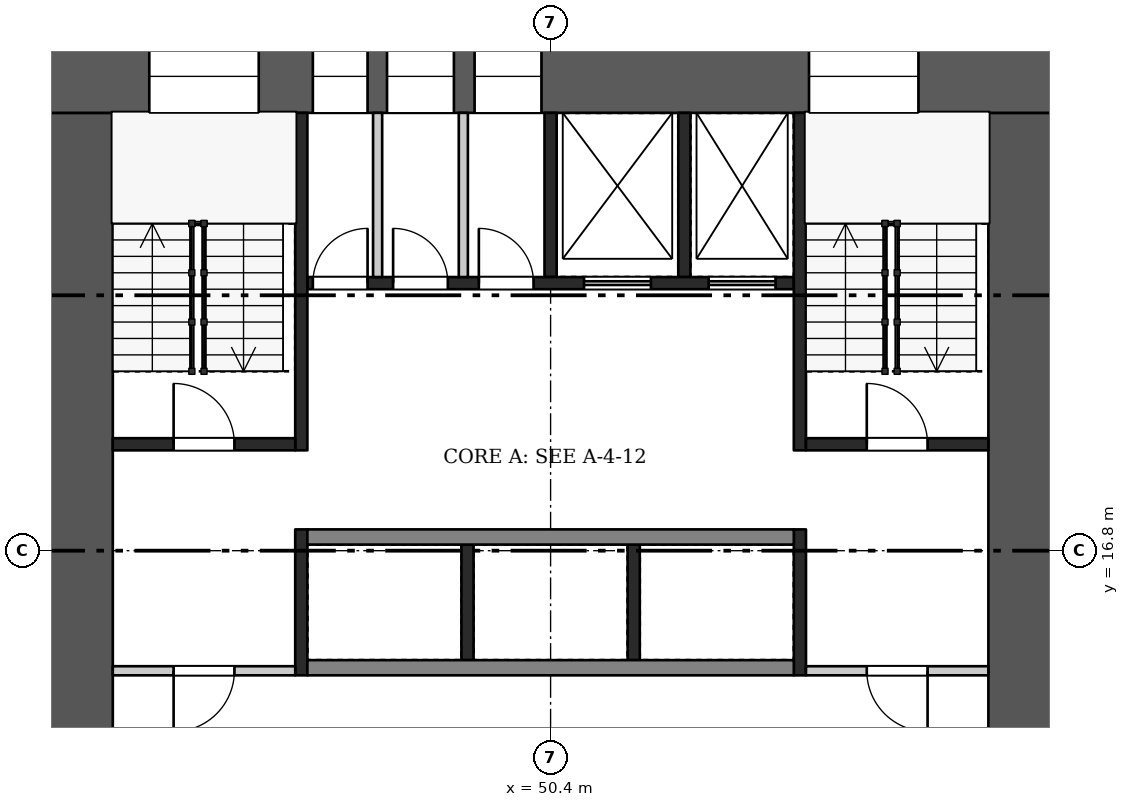
"""IFC4 building model, lengths in metres.
Left out: names, types, materials, properties, quantities, classifications, styles, units other than length and angle.
Written with IfcOpenShell. Run it as: python <this file> out.ifc"""

import sys

from ifc_helpers import new_model, si_unit, direction, frame, frame_2d, origin, place, context, subcontext, project, spatial, rectangle, extrude, element, fill, save


model = new_model("IFC4")
c1 = context("Model", 3, precision=1e-05, world=origin(), true_north=direction((0.0, 1.0)))
c2 = subcontext(c1, "Body", "Model", "MODEL_VIEW")
j1 = project(units=[si_unit("LENGTHUNIT", "METRE"), si_unit("PLANEANGLEUNIT", "RADIAN")], contexts=[c1])
p1 = place(None, origin())
s1 = spatial("IfcSite", under=j1, at=p1, CompositionType="ELEMENT")
p2 = place(p1, origin())
s2 = spatial("IfcBuilding", under=s1, at=p2, CompositionType="ELEMENT")
p3 = place(p2, frame((0.0, 0.0, 56.7)))
s3 = spatial("IfcBuildingStorey", under=s2, at=p3, CompositionType="ELEMENT", Elevation=56.7)
p4 = place(p3, frame((42.0, 24.6, 0.0), z_axis=(0.0, 0.0, 1.0), x_axis=(1.0, 0.0, 0.0)))
e1 = element("IfcWall", 1, at=p4, inside=s3, PredefinedType="SHEAR", context=c2, shape_type="SweptSolid", body=[
    extrude(rectangle(XDim=16.8, YDim=1.2, at=frame_2d((8.4, 0.0))), origin(), (0.0, 0.0, 1.0), 3.22),
])
p5 = place(p4, frame((1.8, 0.0, 0.5)))
e2 = element("IfcOpeningElement", 2, at=p5, cuts=e1, PredefinedType="OPENING", context=c2, shape_type="SweptSolid", body=[
    extrude(rectangle(XDim=1.8, YDim=2.4, at=frame_2d((0.9, 1.2))), frame((0.0, 0.61, 0.0), z_axis=(0.0, -1.0, 0.0), x_axis=(1.0, 0.0, 0.0)), (0.0, 0.0, 1.0), 1.22),
])
p6 = place(p4, frame((4.49, 0.0, 1.6)))
e3 = element("IfcOpeningElement", 3, at=p6, cuts=e1, PredefinedType="OPENING", context=c2, shape_type="SweptSolid", body=[
    extrude(rectangle(XDim=0.9, YDim=1.2, at=frame_2d((0.45, 0.6))), frame((0.0, 0.61, 0.0), z_axis=(0.0, -1.0, 0.0), x_axis=(1.0, 0.0, 0.0)), (0.0, 0.0, 1.0), 1.22),
])
p7 = place(p4, frame((5.71, 0.0, 1.6)))
e4 = element("IfcOpeningElement", 4, at=p7, cuts=e1, PredefinedType="OPENING", context=c2, shape_type="SweptSolid", body=[
    extrude(rectangle(XDim=1.1, YDim=1.2, at=frame_2d((0.55, 0.6))), frame((0.0, 0.61, 0.0), z_axis=(0.0, -1.0, 0.0), x_axis=(1.0, 0.0, 0.0)), (0.0, 0.0, 1.0), 1.22),
])
p8 = place(p4, frame((7.15, 0.0, 1.6)))
e5 = element("IfcOpeningElement", 5, at=p8, cuts=e1, PredefinedType="OPENING", context=c2, shape_type="SweptSolid", body=[
    extrude(rectangle(XDim=1.1, YDim=1.2, at=frame_2d((0.55, 0.6))), frame((0.0, 0.61, 0.0), z_axis=(0.0, -1.0, 0.0), x_axis=(1.0, 0.0, 0.0)), (0.0, 0.0, 1.0), 1.22),
])
p9 = place(p4, frame((12.65, 0.0, 0.5)))
e6 = element("IfcOpeningElement", 6, at=p9, cuts=e1, PredefinedType="OPENING", context=c2, shape_type="SweptSolid", body=[
    extrude(rectangle(XDim=1.8, YDim=2.4, at=frame_2d((0.9, 1.2))), frame((0.0, 0.61, 0.0), z_axis=(0.0, -1.0, 0.0), x_axis=(1.0, 0.0, 0.0)), (0.0, 0.0, 1.0), 1.22),
])
p10 = place(p3, frame((42.6, 9.6, 0.0), z_axis=(0.0, 0.0, 1.0), x_axis=(0.0, 1.0, 0.0)))
e7 = element("IfcWall", 7, at=p10, inside=s3, PredefinedType="SHEAR", context=c2, shape_type="SweptSolid", body=[
    extrude(rectangle(XDim=14.4, YDim=1.2, at=frame_2d((7.2, 0.0))), origin(), (0.0, 0.0, 1.0), 3.22),
])
p11 = place(p10, frame((2.1, 0.0, 0.0)))
e8 = element("IfcOpeningElement", 8, at=p11, cuts=e7, PredefinedType="OPENING", context=c2, shape_type="SweptSolid", body=[
    extrude(rectangle(XDim=1.8, YDim=2.1, at=frame_2d((0.9, 1.05))), frame((0.0, 0.61, 0.0), z_axis=(0.0, -1.0, 0.0), x_axis=(1.0, 0.0, 0.0)), (0.0, 0.0, 1.0), 1.22),
])
p12 = place(p3, frame((58.2, 9.6, 0.0), z_axis=(0.0, 0.0, 1.0), x_axis=(0.0, 1.0, 0.0)))
e9 = element("IfcWall", 9, at=p12, inside=s3, PredefinedType="SHEAR", context=c2, shape_type="SweptSolid", body=[
    extrude(rectangle(XDim=14.4, YDim=1.2, at=frame_2d((7.2, 0.0))), origin(), (0.0, 0.0, 1.0), 3.22),
])
p13 = place(p12, frame((2.1, 0.0, 0.0)))
e10 = element("IfcOpeningElement", 10, at=p13, cuts=e9, PredefinedType="OPENING", context=c2, shape_type="SweptSolid", body=[
    extrude(rectangle(XDim=1.8, YDim=2.1, at=frame_2d((0.9, 1.05))), frame((0.0, 0.61, 0.0), z_axis=(0.0, -1.0, 0.0), x_axis=(1.0, 0.0, 0.0)), (0.0, 0.0, 1.0), 1.22),
])
for number, where, z_axis, x_axis in (
    (11, (49.033, 15.0, 0.0), (0.0, 0.0, 1.0), (0.0, 1.0, 0.0)),
    (12, (51.767, 15.0, 0.0), (0.0, 0.0, 1.0), (0.0, 1.0, 0.0)),
):
    element("IfcWall", number, at=place(p3, frame(where, z_axis=z_axis, x_axis=x_axis)), inside=s3, PredefinedType="SHEAR", context=c2, shape_type="SweptSolid", body=[
        extrude(rectangle(XDim=1.9, YDim=0.2, at=frame_2d((0.95, 0.0))), origin(), (0.0, 0.0, 1.0), 3.22),
    ])
for number, where, z_axis, x_axis in (
    (13, (46.4, 14.875, 0.0), (0.0, 0.0, 1.0), (1.0, 0.0, 0.0)),
    (14, (46.4, 17.025, 0.0), (0.0, 0.0, 1.0), (1.0, 0.0, 0.0)),
):
    element("IfcWall", number, at=place(p3, frame(where, z_axis=z_axis, x_axis=x_axis)), inside=s3, PredefinedType="SHEAR", context=c2, shape_type="SweptSolid", body=[
        extrude(rectangle(XDim=8.0, YDim=0.25, at=frame_2d((4.0, 0.0))), origin(), (0.0, 0.0, 1.0), 3.22),
    ])
for number, where, z_axis, x_axis in (
    (15, (50.4, 21.3, 0.0), (0.0, 0.0, 1.0), (0.0, 1.0, 0.0)),
    (16, (52.6, 21.3, 0.0), (0.0, 0.0, 1.0), (0.0, 1.0, 0.0)),
):
    element("IfcWall", number, at=place(p3, frame(where, z_axis=z_axis, x_axis=x_axis)), inside=s3, PredefinedType="SHEAR", context=c2, shape_type="SweptSolid", body=[
        extrude(rectangle(XDim=2.7, YDim=0.2, at=frame_2d((1.35, 0.0))), origin(), (0.0, 0.0, 1.0), 3.22),
    ])
for number, where, z_axis, x_axis in (
    (17, (47.555, 21.3, 0.0), (0.0, 0.0, 1.0), (0.0, 1.0, 0.0)),
    (18, (48.965, 21.3, 0.0), (0.0, 0.0, 1.0), (0.0, 1.0, 0.0)),
):
    element("IfcWall", number, at=place(p3, frame(where, z_axis=z_axis, x_axis=x_axis)), inside=s3, PredefinedType="PARTITIONING", context=c2, shape_type="SweptSolid", body=[
        extrude(rectangle(XDim=2.7, YDim=0.15, at=frame_2d((1.35, 0.0))), origin(), (0.0, 0.0, 1.0), 3.22),
    ])
p14 = place(p3, frame((46.4, 21.2, 0.0), z_axis=(0.0, 0.0, 1.0), x_axis=(1.0, 0.0, 0.0)))
e19 = element("IfcWall", 19, at=p14, inside=s3, PredefinedType="SHEAR", context=c2, shape_type="SweptSolid", body=[
    extrude(rectangle(XDim=8.0, YDim=0.2, at=frame_2d((4.0, 0.0))), origin(), (0.0, 0.0, 1.0), 3.22),
])
p15 = place(p14, frame((0.09, 0.0, 0.0)))
e20 = element("IfcOpeningElement", 20, at=p15, cuts=e19, PredefinedType="OPENING", context=c2, shape_type="SweptSolid", body=[
    extrude(rectangle(XDim=0.9, YDim=2.1, at=frame_2d((0.45, 1.05))), frame((0.0, 0.11, 0.0), z_axis=(0.0, -1.0, 0.0), x_axis=(1.0, 0.0, 0.0)), (0.0, 0.0, 1.0), 0.22),
])
p16 = place(p14, frame((1.41, 0.0, 0.0)))
e21 = element("IfcOpeningElement", 21, at=p16, cuts=e19, PredefinedType="OPENING", context=c2, shape_type="SweptSolid", body=[
    extrude(rectangle(XDim=0.9, YDim=2.1, at=frame_2d((0.45, 1.05))), frame((0.0, 0.11, 0.0), z_axis=(0.0, -1.0, 0.0), x_axis=(1.0, 0.0, 0.0)), (0.0, 0.0, 1.0), 0.22),
])
p17 = place(p14, frame((2.82, 0.0, 0.0)))
e22 = element("IfcOpeningElement", 22, at=p17, cuts=e19, PredefinedType="OPENING", context=c2, shape_type="SweptSolid", body=[
    extrude(rectangle(XDim=0.9, YDim=2.1, at=frame_2d((0.45, 1.05))), frame((0.0, 0.11, 0.0), z_axis=(0.0, -1.0, 0.0), x_axis=(1.0, 0.0, 0.0)), (0.0, 0.0, 1.0), 0.22),
])
p18 = place(p14, frame((4.55, 0.0, 0.0)))
e23 = element("IfcOpeningElement", 23, at=p18, cuts=e19, PredefinedType="OPENING", context=c2, shape_type="SweptSolid", body=[
    extrude(rectangle(XDim=1.1, YDim=2.1, at=frame_2d((0.55, 1.05))), frame((0.0, 0.11, 0.0), z_axis=(0.0, -1.0, 0.0), x_axis=(1.0, 0.0, 0.0)), (0.0, 0.0, 1.0), 0.22),
])
p19 = place(p14, frame((6.6, 0.0, 0.0)))
e24 = element("IfcOpeningElement", 24, at=p19, cuts=e19, PredefinedType="OPENING", context=c2, shape_type="SweptSolid", body=[
    extrude(rectangle(XDim=1.1, YDim=2.1, at=frame_2d((0.55, 1.05))), frame((0.0, 0.11, 0.0), z_axis=(0.0, -1.0, 0.0), x_axis=(1.0, 0.0, 0.0)), (0.0, 0.0, 1.0), 0.22),
])
p20 = place(p3, frame((46.3, 14.75, 0.0), z_axis=(0.0, 0.0, 1.0), x_axis=(0.0, 1.0, 0.0)))
e25 = element("IfcWall", 25, at=p20, inside=s3, PredefinedType="SHEAR", context=c2, shape_type="SweptSolid", body=[
    extrude(rectangle(XDim=2.4, YDim=0.2, at=frame_2d((1.2, 0.0))), origin(), (0.0, 0.0, 1.0), 3.22),
])
p21 = place(p3, frame((46.3, 18.45, 0.0), z_axis=(0.0, 0.0, 1.0), x_axis=(0.0, 1.0, 0.0)))
e26 = element("IfcWall", 26, at=p21, inside=s3, PredefinedType="SHEAR", context=c2, shape_type="SweptSolid", body=[
    extrude(rectangle(XDim=5.55, YDim=0.2, at=frame_2d((2.775, 0.0))), origin(), (0.0, 0.0, 1.0), 3.22),
])
p22 = place(p3, frame((43.2, 14.825, 0.0), z_axis=(0.0, 0.0, 1.0), x_axis=(1.0, 0.0, 0.0)))
e27 = element("IfcWall", 27, at=p22, inside=s3, PredefinedType="PARTITIONING", context=c2, shape_type="SweptSolid", body=[
    extrude(rectangle(XDim=3.0, YDim=0.15, at=frame_2d((1.5, 0.0))), origin(), (0.0, 0.0, 1.0), 3.22),
])
p23 = place(p22, frame((1.0, 0.0, 0.0)))
e28 = element("IfcOpeningElement", 28, at=p23, cuts=e27, PredefinedType="OPENING", context=c2, shape_type="SweptSolid", body=[
    extrude(rectangle(XDim=1.0, YDim=2.1, at=frame_2d((0.5, 1.05))), frame((0.0, 0.085, 0.0), z_axis=(0.0, -1.0, 0.0), x_axis=(1.0, 0.0, 0.0)), (0.0, 0.0, 1.0), 0.17),
])
p24 = place(p3, frame((43.2, 18.55, 0.0), z_axis=(0.0, 0.0, 1.0), x_axis=(1.0, 0.0, 0.0)))
e29 = element("IfcWall", 29, at=p24, inside=s3, PredefinedType="SHEAR", context=c2, shape_type="SweptSolid", body=[
    extrude(rectangle(XDim=3.0, YDim=0.2, at=frame_2d((1.5, 0.0))), origin(), (0.0, 0.0, 1.0), 3.22),
])
p25 = place(p24, frame((1.0, 0.0, 0.0)))
e30 = element("IfcOpeningElement", 30, at=p25, cuts=e29, PredefinedType="OPENING", context=c2, shape_type="SweptSolid", body=[
    extrude(rectangle(XDim=1.0, YDim=2.1, at=frame_2d((0.5, 1.05))), frame((0.0, 0.11, 0.0), z_axis=(0.0, -1.0, 0.0), x_axis=(1.0, 0.0, 0.0)), (0.0, 0.0, 1.0), 0.22),
])
p26 = place(p3, frame((54.5, 14.75, 0.0), z_axis=(0.0, 0.0, 1.0), x_axis=(0.0, 1.0, 0.0)))
e31 = element("IfcWall", 31, at=p26, inside=s3, PredefinedType="SHEAR", context=c2, shape_type="SweptSolid", body=[
    extrude(rectangle(XDim=2.4, YDim=0.2, at=frame_2d((1.2, 0.0))), origin(), (0.0, 0.0, 1.0), 3.22),
])
p27 = place(p3, frame((54.5, 18.45, 0.0), z_axis=(0.0, 0.0, 1.0), x_axis=(0.0, 1.0, 0.0)))
e32 = element("IfcWall", 32, at=p27, inside=s3, PredefinedType="SHEAR", context=c2, shape_type="SweptSolid", body=[
    extrude(rectangle(XDim=5.55, YDim=0.2, at=frame_2d((2.775, 0.0))), origin(), (0.0, 0.0, 1.0), 3.22),
])
p28 = place(p3, frame((54.6, 14.825, 0.0), z_axis=(0.0, 0.0, 1.0), x_axis=(1.0, 0.0, 0.0)))
e33 = element("IfcWall", 33, at=p28, inside=s3, PredefinedType="PARTITIONING", context=c2, shape_type="SweptSolid", body=[
    extrude(rectangle(XDim=3.0, YDim=0.15, at=frame_2d((1.5, 0.0))), origin(), (0.0, 0.0, 1.0), 3.22),
])
p29 = place(p28, frame((1.0, 0.0, 0.0)))
e34 = element("IfcOpeningElement", 34, at=p29, cuts=e33, PredefinedType="OPENING", context=c2, shape_type="SweptSolid", body=[
    extrude(rectangle(XDim=1.0, YDim=2.1, at=frame_2d((0.5, 1.05))), frame((0.0, 0.085, 0.0), z_axis=(0.0, -1.0, 0.0), x_axis=(1.0, 0.0, 0.0)), (0.0, 0.0, 1.0), 0.17),
])
p30 = place(p3, frame((54.6, 18.55, 0.0), z_axis=(0.0, 0.0, 1.0), x_axis=(1.0, 0.0, 0.0)))
e35 = element("IfcWall", 35, at=p30, inside=s3, PredefinedType="SHEAR", context=c2, shape_type="SweptSolid", body=[
    extrude(rectangle(XDim=3.0, YDim=0.2, at=frame_2d((1.5, 0.0))), origin(), (0.0, 0.0, 1.0), 3.22),
])
p31 = place(p30, frame((1.0, 0.0, 0.0)))
e36 = element("IfcOpeningElement", 36, at=p31, cuts=e35, PredefinedType="OPENING", context=c2, shape_type="SweptSolid", body=[
    extrude(rectangle(XDim=1.0, YDim=2.1, at=frame_2d((0.5, 1.05))), frame((0.0, 0.11, 0.0), z_axis=(0.0, -1.0, 0.0), x_axis=(1.0, 0.0, 0.0)), (0.0, 0.0, 1.0), 0.22),
])
p32 = place(p15, origin())
e37 = element("IfcDoor", 37, at=p32, inside=s3, OperationType="SINGLE_SWING_RIGHT", PredefinedType="DOOR", context=c2, shape_type="SweptSolid", body=[
    extrude(rectangle(XDim=0.9, YDim=2.1, at=frame_2d((0.45, 1.05))), frame((0.0, 0.025, 0.0), z_axis=(0.0, -1.0, 0.0), x_axis=(1.0, 0.0, 0.0)), (0.0, 0.0, 1.0), 0.05),
])
fill(e20, e37)
p33 = place(p16, origin())
e38 = element("IfcDoor", 38, at=p33, inside=s3, OperationType="SINGLE_SWING_LEFT", PredefinedType="DOOR", context=c2, shape_type="SweptSolid", body=[
    extrude(rectangle(XDim=0.9, YDim=2.1, at=frame_2d((0.45, 1.05))), frame((0.0, 0.025, 0.0), z_axis=(0.0, -1.0, 0.0), x_axis=(1.0, 0.0, 0.0)), (0.0, 0.0, 1.0), 0.05),
])
fill(e21, e38)
p34 = place(p17, origin())
e39 = element("IfcDoor", 39, at=p34, inside=s3, OperationType="SINGLE_SWING_LEFT", PredefinedType="DOOR", context=c2, shape_type="SweptSolid", body=[
    extrude(rectangle(XDim=0.9, YDim=2.1, at=frame_2d((0.45, 1.05))), frame((0.0, 0.025, 0.0), z_axis=(0.0, -1.0, 0.0), x_axis=(1.0, 0.0, 0.0)), (0.0, 0.0, 1.0), 0.05),
])
fill(e22, e39)
p35 = place(p18, origin())
e40 = element("IfcDoor", 40, at=p35, inside=s3, OperationType="DOUBLE_DOOR_SLIDING", PredefinedType="DOOR", context=c2, shape_type="SweptSolid", body=[
    extrude(rectangle(XDim=1.1, YDim=2.1, at=frame_2d((0.55, 1.05))), frame((0.0, 0.025, 0.0), z_axis=(0.0, -1.0, 0.0), x_axis=(1.0, 0.0, 0.0)), (0.0, 0.0, 1.0), 0.05),
])
fill(e23, e40)
p36 = place(p19, origin())
e41 = element("IfcDoor", 41, at=p36, inside=s3, OperationType="DOUBLE_DOOR_SLIDING", PredefinedType="DOOR", context=c2, shape_type="SweptSolid", body=[
    extrude(rectangle(XDim=1.1, YDim=2.1, at=frame_2d((0.55, 1.05))), frame((0.0, 0.025, 0.0), z_axis=(0.0, -1.0, 0.0), x_axis=(1.0, 0.0, 0.0)), (0.0, 0.0, 1.0), 0.05),
])
fill(e24, e41)
p37 = place(p23, frame((1.0, 0.0, 0.0), z_axis=(0.0, 0.0, 1.0), x_axis=(-1.0, 0.0, 0.0)))
e42 = element("IfcDoor", 42, at=p37, inside=s3, OperationType="SINGLE_SWING_RIGHT", PredefinedType="DOOR", context=c2, shape_type="SweptSolid", body=[
    extrude(rectangle(XDim=1.0, YDim=2.1, at=frame_2d((0.5, 1.05))), frame((0.0, 0.025, 0.0), z_axis=(0.0, -1.0, 0.0), x_axis=(1.0, 0.0, 0.0)), (0.0, 0.0, 1.0), 0.05),
])
fill(e28, e42)
p38 = place(p25, origin())
e43 = element("IfcDoor", 43, at=p38, inside=s3, OperationType="SINGLE_SWING_LEFT", PredefinedType="DOOR", context=c2, shape_type="SweptSolid", body=[
    extrude(rectangle(XDim=1.0, YDim=2.1, at=frame_2d((0.5, 1.05))), frame((0.0, 0.025, 0.0), z_axis=(0.0, -1.0, 0.0), x_axis=(1.0, 0.0, 0.0)), (0.0, 0.0, 1.0), 0.05),
])
fill(e30, e43)
p39 = place(p29, frame((1.0, 0.0, 0.0), z_axis=(0.0, 0.0, 1.0), x_axis=(-1.0, 0.0, 0.0)))
e44 = element("IfcDoor", 44, at=p39, inside=s3, OperationType="SINGLE_SWING_LEFT", PredefinedType="DOOR", context=c2, shape_type="SweptSolid", body=[
    extrude(rectangle(XDim=1.0, YDim=2.1, at=frame_2d((0.5, 1.05))), frame((0.0, 0.025, 0.0), z_axis=(0.0, -1.0, 0.0), x_axis=(1.0, 0.0, 0.0)), (0.0, 0.0, 1.0), 0.05),
])
fill(e34, e44)
p40 = place(p31, origin())
e45 = element("IfcDoor", 45, at=p40, inside=s3, OperationType="SINGLE_SWING_LEFT", PredefinedType="DOOR", context=c2, shape_type="SweptSolid", body=[
    extrude(rectangle(XDim=1.0, YDim=2.1, at=frame_2d((0.5, 1.05))), frame((0.0, 0.025, 0.0), z_axis=(0.0, -1.0, 0.0), x_axis=(1.0, 0.0, 0.0)), (0.0, 0.0, 1.0), 0.05),
])
fill(e36, e45)
p41 = place(p5, origin())
e46 = element("IfcWindow", 46, at=p41, inside=s3, PartitioningType="SINGLE_PANEL", PredefinedType="WINDOW", context=c2, shape_type="SweptSolid", body=[
    extrude(rectangle(XDim=1.8, YDim=2.4, at=frame_2d((0.9, 1.2))), frame((0.0, 0.03, 0.0), z_axis=(0.0, -1.0, 0.0), x_axis=(1.0, 0.0, 0.0)), (0.0, 0.0, 1.0), 0.06),
])
fill(e2, e46)
p42 = place(p6, origin())
e47 = element("IfcWindow", 47, at=p42, inside=s3, PartitioningType="SINGLE_PANEL", PredefinedType="WINDOW", context=c2, shape_type="SweptSolid", body=[
    extrude(rectangle(XDim=0.9, YDim=1.2, at=frame_2d((0.45, 0.6))), frame((0.0, 0.03, 0.0), z_axis=(0.0, -1.0, 0.0), x_axis=(1.0, 0.0, 0.0)), (0.0, 0.0, 1.0), 0.06),
])
fill(e3, e47)
p43 = place(p7, origin())
e48 = element("IfcWindow", 48, at=p43, inside=s3, PartitioningType="SINGLE_PANEL", PredefinedType="WINDOW", context=c2, shape_type="SweptSolid", body=[
    extrude(rectangle(XDim=1.1, YDim=1.2, at=frame_2d((0.55, 0.6))), frame((0.0, 0.03, 0.0), z_axis=(0.0, -1.0, 0.0), x_axis=(1.0, 0.0, 0.0)), (0.0, 0.0, 1.0), 0.06),
])
fill(e4, e48)
p44 = place(p8, origin())
e49 = element("IfcWindow", 49, at=p44, inside=s3, PartitioningType="SINGLE_PANEL", PredefinedType="WINDOW", context=c2, shape_type="SweptSolid", body=[
    extrude(rectangle(XDim=1.1, YDim=1.2, at=frame_2d((0.55, 0.6))), frame((0.0, 0.03, 0.0), z_axis=(0.0, -1.0, 0.0), x_axis=(1.0, 0.0, 0.0)), (0.0, 0.0, 1.0), 0.06),
])
fill(e5, e49)
p45 = place(p9, origin())
e50 = element("IfcWindow", 50, at=p45, inside=s3, PartitioningType="SINGLE_PANEL", PredefinedType="WINDOW", context=c2, shape_type="SweptSolid", body=[
    extrude(rectangle(XDim=1.8, YDim=2.4, at=frame_2d((0.9, 1.2))), frame((0.0, 0.03, 0.0), z_axis=(0.0, -1.0, 0.0), x_axis=(1.0, 0.0, 0.0)), (0.0, 0.0, 1.0), 0.06),
])
fill(e6, e50)
save(model, sys.argv[1])
